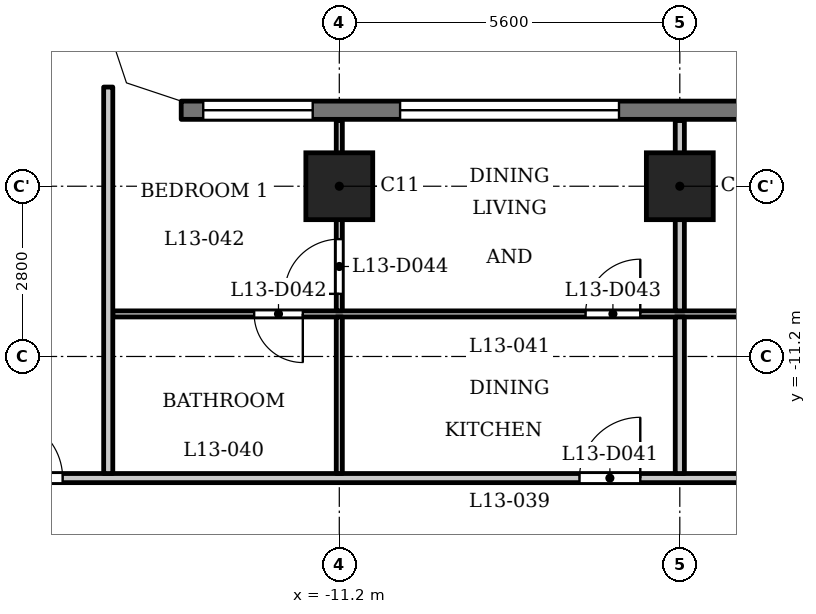
"""IFC4 building model, lengths in metres.
Left out: names, types, materials, properties, quantities, classifications, styles, units other than length and angle.
Written with IfcOpenShell. Run it as: python <this file> out.ifc"""

import sys

from ifc_helpers import new_model, si_unit, direction, frame, frame_2d, origin, origin_2d, place, context, subcontext, project, spatial, polyline, rectangle, outline, extrude, element, fill, save


model = new_model("IFC4")
c1 = context("Model", 3, precision=1e-05, world=origin(), true_north=direction((0.0, 1.0)))
c2 = subcontext(c1, "Body", "Model", "MODEL_VIEW")
j1 = project(units=[si_unit("LENGTHUNIT", "METRE"), si_unit("PLANEANGLEUNIT", "RADIAN")], contexts=[c1])
p1 = place(None, origin())
s1 = spatial("IfcSite", under=j1, at=p1, CompositionType="ELEMENT")
p2 = place(p1, origin())
s2 = spatial("IfcBuilding", under=s1, at=p2, CompositionType="ELEMENT")
p3 = place(p2, frame((0.0, 0.0, 55.0)))
s3 = spatial("IfcBuildingStorey", under=s2, at=p3, CompositionType="ELEMENT", Elevation=55.0)
for number, where, z_axis, x_axis in (
    (1, (-11.2, -8.4, 0.0), (0.0, 0.0, 1.0), (1.0, 0.0, 0.0)),
    (2, (-5.6, -8.4, 0.0), (0.0, 0.0, 1.0), (1.0, 0.0, 0.0)),
):
    element("IfcColumn", number, at=place(p3, frame(where, z_axis=z_axis, x_axis=x_axis)), inside=s3, PredefinedType="COLUMN", context=c2, shape_type="SweptSolid", body=[
        extrude(rectangle(XDim=1.1, YDim=1.1, at=origin_2d()), origin(), (0.0, 0.0, 1.0), 3.5),
    ])
p4 = place(p3, frame((13.8, -7.15, 0.0), z_axis=(0.0, 0.0, 1.0), x_axis=(-1.0, 0.0, 0.0)))
e3 = element("IfcWall", 3, at=p4, inside=s3, PredefinedType="SOLIDWALL", context=c2, shape_type="SweptSolid", body=[
    extrude(rectangle(XDim=27.6, YDim=0.3, at=frame_2d((13.8, 0.0))), origin(), (0.0, 0.0, 1.0), 3.2),
])
p5 = place(p4, frame((0.363, 0.0, 0.9)))
e4 = element("IfcOpeningElement", 4, at=p5, cuts=e3, PredefinedType="OPENING", context=c2, shape_type="SweptSolid", body=[
    extrude(rectangle(XDim=1.8, YDim=1.25, at=frame_2d((0.9, 0.625))), frame((0.0, 0.16, 0.0), z_axis=(0.0, -1.0, 0.0), x_axis=(1.0, 0.0, 0.0)), (0.0, 0.0, 1.0), 0.32),
])
p6 = place(p4, frame((3.6, 0.0, 1.2)))
e5 = element("IfcOpeningElement", 5, at=p6, cuts=e3, PredefinedType="OPENING", context=c2, shape_type="SweptSolid", body=[
    extrude(rectangle(XDim=3.6, YDim=0.95, at=frame_2d((1.8, 0.475))), frame((0.0, 0.16, 0.0), z_axis=(0.0, -1.0, 0.0), x_axis=(1.0, 0.0, 0.0)), (0.0, 0.0, 1.0), 0.32),
])
p7 = place(p4, frame((9.2, 0.0, 1.2)))
e6 = element("IfcOpeningElement", 6, at=p7, cuts=e3, PredefinedType="OPENING", context=c2, shape_type="SweptSolid", body=[
    extrude(rectangle(XDim=3.6, YDim=0.95, at=frame_2d((1.8, 0.475))), frame((0.0, 0.16, 0.0), z_axis=(0.0, -1.0, 0.0), x_axis=(1.0, 0.0, 0.0)), (0.0, 0.0, 1.0), 0.32),
])
p8 = place(p4, frame((14.8, 0.0, 1.2)))
e7 = element("IfcOpeningElement", 7, at=p8, cuts=e3, PredefinedType="OPENING", context=c2, shape_type="SweptSolid", body=[
    extrude(rectangle(XDim=3.6, YDim=0.95, at=frame_2d((1.8, 0.475))), frame((0.0, 0.16, 0.0), z_axis=(0.0, -1.0, 0.0), x_axis=(1.0, 0.0, 0.0)), (0.0, 0.0, 1.0), 0.32),
])
p9 = place(p4, frame((20.4, 0.0, 1.2)))
e8 = element("IfcOpeningElement", 8, at=p9, cuts=e3, PredefinedType="OPENING", context=c2, shape_type="SweptSolid", body=[
    extrude(rectangle(XDim=3.6, YDim=0.95, at=frame_2d((1.8, 0.475))), frame((0.0, 0.16, 0.0), z_axis=(0.0, -1.0, 0.0), x_axis=(1.0, 0.0, 0.0)), (0.0, 0.0, 1.0), 0.32),
])
p10 = place(p4, frame((25.438, 0.0, 0.9)))
e9 = element("IfcOpeningElement", 9, at=p10, cuts=e3, PredefinedType="OPENING", context=c2, shape_type="SweptSolid", body=[
    extrude(rectangle(XDim=1.8, YDim=1.25, at=frame_2d((0.9, 0.625))), frame((0.0, 0.16, 0.0), z_axis=(0.0, -1.0, 0.0), x_axis=(1.0, 0.0, 0.0)), (0.0, 0.0, 1.0), 0.32),
])
p11 = place(p3, frame((-17.4, -13.2, 0.0), z_axis=(0.0, 0.0, 1.0), x_axis=(1.0, 0.0, 0.0)))
e10 = element("IfcWall", 10, at=p11, inside=s3, PredefinedType="PARTITIONING", context=c2, shape_type="SweptSolid", body=[
    extrude(rectangle(XDim=34.8, YDim=0.15, at=frame_2d((17.4, 0.0))), origin(), (0.0, 0.0, 1.0), 3.2),
])
p12 = place(p11, frame((0.65, 0.0, 0.0)))
e11 = element("IfcOpeningElement", 11, at=p12, cuts=e10, PredefinedType="OPENING", context=c2, shape_type="SweptSolid", body=[
    extrude(rectangle(XDim=1.0, YDim=2.1, at=frame_2d((0.5, 1.05))), frame((0.0, 0.085, 0.0), z_axis=(0.0, -1.0, 0.0), x_axis=(1.0, 0.0, 0.0)), (0.0, 0.0, 1.0), 0.17),
])
p13 = place(p11, frame((33.05, 0.0, 0.0)))
e12 = element("IfcOpeningElement", 12, at=p13, cuts=e10, PredefinedType="OPENING", context=c2, shape_type="SweptSolid", body=[
    extrude(rectangle(XDim=1.0, YDim=2.1, at=frame_2d((0.5, 1.05))), frame((0.0, 0.085, 0.0), z_axis=(0.0, -1.0, 0.0), x_axis=(1.0, 0.0, 0.0)), (0.0, 0.0, 1.0), 0.17),
])
p14 = place(p11, frame((10.15, 0.0, 0.0)))
e13 = element("IfcOpeningElement", 13, at=p14, cuts=e10, PredefinedType="OPENING", context=c2, shape_type="SweptSolid", body=[
    extrude(rectangle(XDim=1.0, YDim=2.1, at=frame_2d((0.5, 1.05))), frame((0.0, 0.085, 0.0), z_axis=(0.0, -1.0, 0.0), x_axis=(1.0, 0.0, 0.0)), (0.0, 0.0, 1.0), 0.17),
])
p15 = place(p11, frame((21.35, 0.0, 0.0)))
e14 = element("IfcOpeningElement", 14, at=p15, cuts=e10, PredefinedType="OPENING", context=c2, shape_type="SweptSolid", body=[
    extrude(rectangle(XDim=1.0, YDim=2.1, at=frame_2d((0.5, 1.05))), frame((0.0, 0.085, 0.0), z_axis=(0.0, -1.0, 0.0), x_axis=(1.0, 0.0, 0.0)), (0.0, 0.0, 1.0), 0.17),
])
p16 = place(p11, frame((30.75, 0.0, 0.0)))
e15 = element("IfcOpeningElement", 15, at=p16, cuts=e10, PredefinedType="OPENING", context=c2, shape_type="SweptSolid", body=[
    extrude(rectangle(XDim=1.0, YDim=2.1, at=frame_2d((0.5, 1.05))), frame((0.0, 0.085, 0.0), z_axis=(0.0, -1.0, 0.0), x_axis=(1.0, 0.0, 0.0)), (0.0, 0.0, 1.0), 0.17),
])
p17 = place(p3, frame((-14.925, -10.5, 0.0), z_axis=(0.0, 0.0, 1.0), x_axis=(1.0, 0.0, 0.0)))
e16 = element("IfcWall", 16, at=p17, inside=s3, PredefinedType="PARTITIONING", context=c2, shape_type="SweptSolid", body=[
    extrude(rectangle(XDim=29.85, YDim=0.1, at=frame_2d((14.925, 0.0))), origin(), (0.0, 0.0, 1.0), 3.2),
])
p18 = place(p17, frame((2.325, 0.0, 0.0)))
e17 = element("IfcOpeningElement", 17, at=p18, cuts=e16, PredefinedType="OPENING", context=c2, shape_type="SweptSolid", body=[
    extrude(rectangle(XDim=0.8, YDim=2.1, at=frame_2d((0.4, 1.05))), frame((0.0, 0.06, 0.0), z_axis=(0.0, -1.0, 0.0), x_axis=(1.0, 0.0, 0.0)), (0.0, 0.0, 1.0), 0.12),
])
p19 = place(p17, frame((7.775, 0.0, 0.0)))
e18 = element("IfcOpeningElement", 18, at=p19, cuts=e16, PredefinedType="OPENING", context=c2, shape_type="SweptSolid", body=[
    extrude(rectangle(XDim=0.9, YDim=2.1, at=frame_2d((0.45, 1.05))), frame((0.0, 0.06, 0.0), z_axis=(0.0, -1.0, 0.0), x_axis=(1.0, 0.0, 0.0)), (0.0, 0.0, 1.0), 0.12),
])
p20 = place(p17, frame((13.475, 0.0, 0.0)))
e19 = element("IfcOpeningElement", 19, at=p20, cuts=e16, PredefinedType="OPENING", context=c2, shape_type="SweptSolid", body=[
    extrude(rectangle(XDim=0.8, YDim=2.1, at=frame_2d((0.4, 1.05))), frame((0.0, 0.06, 0.0), z_axis=(0.0, -1.0, 0.0), x_axis=(1.0, 0.0, 0.0)), (0.0, 0.0, 1.0), 0.12),
])
p21 = place(p17, frame((18.975, 0.0, 0.0)))
e20 = element("IfcOpeningElement", 20, at=p21, cuts=e16, PredefinedType="OPENING", context=c2, shape_type="SweptSolid", body=[
    extrude(rectangle(XDim=0.9, YDim=2.1, at=frame_2d((0.45, 1.05))), frame((0.0, 0.06, 0.0), z_axis=(0.0, -1.0, 0.0), x_axis=(1.0, 0.0, 0.0)), (0.0, 0.0, 1.0), 0.12),
])
p22 = place(p17, frame((24.675, 0.0, 0.0)))
e21 = element("IfcOpeningElement", 21, at=p22, cuts=e16, PredefinedType="OPENING", context=c2, shape_type="SweptSolid", body=[
    extrude(rectangle(XDim=0.8, YDim=2.1, at=frame_2d((0.4, 1.05))), frame((0.0, 0.06, 0.0), z_axis=(0.0, -1.0, 0.0), x_axis=(1.0, 0.0, 0.0)), (0.0, 0.0, 1.0), 0.12),
])
p23 = place(p17, frame((28.375, 0.0, 0.0)))
e22 = element("IfcOpeningElement", 22, at=p23, cuts=e16, PredefinedType="OPENING", context=c2, shape_type="SweptSolid", body=[
    extrude(rectangle(XDim=0.9, YDim=2.1, at=frame_2d((0.45, 1.05))), frame((0.0, 0.06, 0.0), z_axis=(0.0, -1.0, 0.0), x_axis=(1.0, 0.0, 0.0)), (0.0, 0.0, 1.0), 0.12),
])
p24 = place(p3, frame((-15.0, -13.125, 0.0), z_axis=(0.0, 0.0, 1.0), x_axis=(0.0, 1.0, 0.0)))
e23 = element("IfcWall", 23, at=p24, inside=s3, PredefinedType="PARTITIONING", context=c2, shape_type="SweptSolid", body=[
    extrude(rectangle(XDim=6.356, YDim=0.15, at=frame_2d((3.178, 0.0))), origin(), (0.0, 0.0, 1.0), 3.2),
])
p25 = place(p3, frame((-11.2, -13.125, 0.0), z_axis=(0.0, 0.0, 1.0), x_axis=(0.0, 1.0, 0.0)))
e24 = element("IfcWall", 24, at=p25, inside=s3, PredefinedType="PARTITIONING", context=c2, shape_type="SweptSolid", body=[
    extrude(rectangle(XDim=2.575, YDim=0.1, at=frame_2d((1.288, 0.0))), origin(), (0.0, 0.0, 1.0), 3.2),
])
p26 = place(p3, frame((-11.2, -10.45, 0.0), z_axis=(0.0, 0.0, 1.0), x_axis=(0.0, 1.0, 0.0)))
e25 = element("IfcWall", 25, at=p26, inside=s3, PredefinedType="PARTITIONING", context=c2, shape_type="SweptSolid", body=[
    extrude(rectangle(XDim=3.13, YDim=0.1, at=frame_2d((1.565, 0.0))), origin(), (0.0, 0.0, 1.0), 3.2),
])
p27 = place(p26, frame((0.28, 0.0, 0.0)))
e26 = element("IfcOpeningElement", 26, at=p27, cuts=e25, PredefinedType="OPENING", context=c2, shape_type="SweptSolid", body=[
    extrude(rectangle(XDim=0.9, YDim=2.1, at=frame_2d((0.45, 1.05))), frame((0.0, 0.06, 0.0), z_axis=(0.0, -1.0, 0.0), x_axis=(1.0, 0.0, 0.0)), (0.0, 0.0, 1.0), 0.12),
])
p28 = place(p3, frame((-5.6, -13.125, 0.0), z_axis=(0.0, 0.0, 1.0), x_axis=(0.0, 1.0, 0.0)))
e27 = element("IfcWall", 27, at=p28, inside=s3, PredefinedType="PARTITIONING", context=c2, shape_type="SweptSolid", body=[
    extrude(rectangle(XDim=2.575, YDim=0.15, at=frame_2d((1.288, 0.0))), origin(), (0.0, 0.0, 1.0), 3.2),
])
p29 = place(p3, frame((-5.6, -10.45, 0.0), z_axis=(0.0, 0.0, 1.0), x_axis=(0.0, 1.0, 0.0)))
e28 = element("IfcWall", 28, at=p29, inside=s3, PredefinedType="PARTITIONING", context=c2, shape_type="SweptSolid", body=[
    extrude(rectangle(XDim=3.13, YDim=0.15, at=frame_2d((1.565, 0.0))), origin(), (0.0, 0.0, 1.0), 3.2),
])
p30 = place(p3, origin())
e29 = element("IfcWall", 29, at=p30, inside=s3, PredefinedType="SOLIDWALL", context=c2, shape_type="SweptSolid", body=[
    extrude(outline(polyline([(-14.937, -6.937), (-13.849, -7.3), (-13.8, -7.3), (-13.8, -7.0), (-14.7, -6.7), (-15.0, -5.8), (-15.3, -5.8), (-15.3, -5.849), (-14.937, -6.937)])), origin(), (0.0, 0.0, 1.0), 3.2),
])
p31 = place(p12, origin())
e30 = element("IfcDoor", 30, at=p31, inside=s3, OperationType="SINGLE_SWING_RIGHT", PredefinedType="DOOR", context=c2, shape_type="SweptSolid", body=[
    extrude(rectangle(XDim=1.0, YDim=2.1, at=frame_2d((0.5, 1.05))), frame((0.0, 0.025, 0.0), z_axis=(0.0, -1.0, 0.0), x_axis=(1.0, 0.0, 0.0)), (0.0, 0.0, 1.0), 0.05),
])
fill(e11, e30)
p32 = place(p14, origin())
e31 = element("IfcDoor", 31, at=p32, inside=s3, OperationType="SINGLE_SWING_LEFT", PredefinedType="DOOR", context=c2, shape_type="SweptSolid", body=[
    extrude(rectangle(XDim=1.0, YDim=2.1, at=frame_2d((0.5, 1.05))), frame((0.0, 0.025, 0.0), z_axis=(0.0, -1.0, 0.0), x_axis=(1.0, 0.0, 0.0)), (0.0, 0.0, 1.0), 0.05),
])
fill(e13, e31)
p33 = place(p18, origin())
e32 = element("IfcDoor", 32, at=p33, inside=s3, OperationType="SINGLE_SWING_RIGHT", PredefinedType="DOOR", context=c2, shape_type="SweptSolid", body=[
    extrude(rectangle(XDim=0.8, YDim=2.1, at=frame_2d((0.4, 1.05))), frame((0.0, 0.025, 0.0), z_axis=(0.0, -1.0, 0.0), x_axis=(1.0, 0.0, 0.0)), (0.0, 0.0, 1.0), 0.05),
])
fill(e17, e32)
p34 = place(p19, origin())
e33 = element("IfcDoor", 33, at=p34, inside=s3, OperationType="SINGLE_SWING_LEFT", PredefinedType="DOOR", context=c2, shape_type="SweptSolid", body=[
    extrude(rectangle(XDim=0.9, YDim=2.1, at=frame_2d((0.45, 1.05))), frame((0.0, 0.025, 0.0), z_axis=(0.0, -1.0, 0.0), x_axis=(1.0, 0.0, 0.0)), (0.0, 0.0, 1.0), 0.05),
])
fill(e18, e33)
p35 = place(p27, origin())
e34 = element("IfcDoor", 34, at=p35, inside=s3, OperationType="SINGLE_SWING_RIGHT", PredefinedType="DOOR", context=c2, shape_type="SweptSolid", body=[
    extrude(rectangle(XDim=0.9, YDim=2.1, at=frame_2d((0.45, 1.05))), frame((0.0, 0.025, 0.0), z_axis=(0.0, -1.0, 0.0), x_axis=(1.0, 0.0, 0.0)), (0.0, 0.0, 1.0), 0.05),
])
fill(e26, e34)
p36 = place(p9, origin())
e35 = element("IfcWindow", 35, at=p36, inside=s3, PartitioningType="SINGLE_PANEL", PredefinedType="WINDOW", context=c2, shape_type="SweptSolid", body=[
    extrude(rectangle(XDim=3.6, YDim=0.95, at=frame_2d((1.8, 0.475))), frame((0.0, 0.03, 0.0), z_axis=(0.0, -1.0, 0.0), x_axis=(1.0, 0.0, 0.0)), (0.0, 0.0, 1.0), 0.06),
])
fill(e8, e35)
p37 = place(p10, origin())
e36 = element("IfcWindow", 36, at=p37, inside=s3, PartitioningType="SINGLE_PANEL", PredefinedType="WINDOW", context=c2, shape_type="SweptSolid", body=[
    extrude(rectangle(XDim=1.8, YDim=1.25, at=frame_2d((0.9, 0.625))), frame((0.0, 0.03, 0.0), z_axis=(0.0, -1.0, 0.0), x_axis=(1.0, 0.0, 0.0)), (0.0, 0.0, 1.0), 0.06),
])
fill(e9, e36)
save(model, sys.argv[1])
